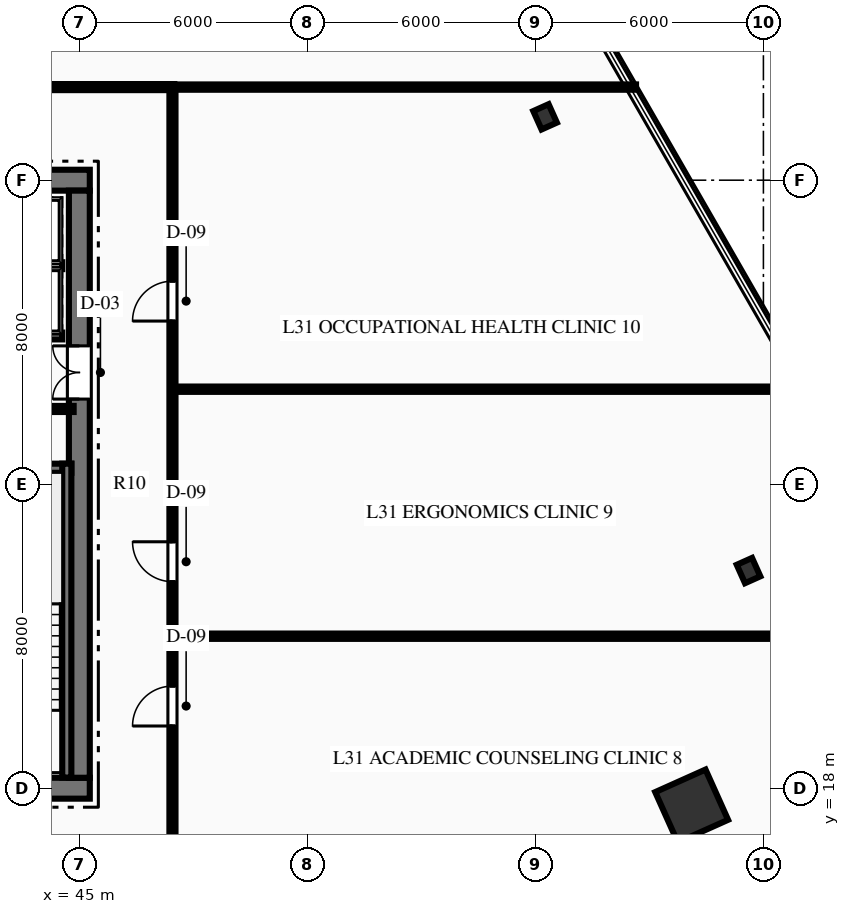
"""IFC4 building model, lengths in metres.
Left out: names, types, materials, properties, quantities, classifications, styles, units other than length and angle.
Written with IfcOpenShell. Run it as: python <this file> out.ifc"""

import sys

from ifc_helpers import new_model, si_unit, direction, frame, frame_2d, origin, origin_2d, place, context, subcontext, project, spatial, rectangle, hollow_rectangle, i_section, extrude, element, fill, save


model = new_model("IFC4")
c1 = context("Model", 3, precision=1e-05, world=origin(), true_north=direction((0.0, 1.0)))
c2 = subcontext(c1, "Body", "Model", "MODEL_VIEW")
j1 = project(units=[si_unit("LENGTHUNIT", "METRE"), si_unit("PLANEANGLEUNIT", "RADIAN")], contexts=[c1])
p1 = place(None, origin())
s1 = spatial("IfcSite", under=j1, at=p1, CompositionType="ELEMENT")
p2 = place(p1, origin())
s2 = spatial("IfcBuilding", under=s1, at=p2, CompositionType="ELEMENT")
p3 = place(p2, frame((0.0, 0.0, 127.95)))
s3 = spatial("IfcBuildingStorey", under=s2, at=p3, CompositionType="ELEMENT", Elevation=127.95)
p4 = place(p3, frame((26.725, 18.0, 0.0), z_axis=(0.0, 0.0, 1.0), x_axis=(1.0, 0.0, 0.0)))
e1 = element("IfcWall", 1, at=p4, inside=s3, PredefinedType="SHEAR", context=c2, shape_type="SweptSolid", body=[
    extrude(rectangle(XDim=18.55, YDim=0.55, at=frame_2d((9.275, 0.0))), origin(), (0.0, 0.0, 1.0), 3.75),
])
p5 = place(p4, frame((7.375, 0.0, 0.0)))
e2 = element("IfcOpeningElement", 2, at=p5, cuts=e1, PredefinedType="OPENING", context=c2, shape_type="SweptSolid", body=[
    extrude(rectangle(XDim=1.1, YDim=2.15, at=frame_2d((0.55, 1.075))), frame((0.0, 0.285, 0.0), z_axis=(0.0, -1.0, 0.0), x_axis=(1.0, 0.0, 0.0)), (0.0, 0.0, 1.0), 0.57),
])
p6 = place(p4, frame((10.075, 0.0, 0.0)))
e3 = element("IfcOpeningElement", 3, at=p6, cuts=e1, PredefinedType="OPENING", context=c2, shape_type="SweptSolid", body=[
    extrude(rectangle(XDim=1.1, YDim=2.15, at=frame_2d((0.55, 1.075))), frame((0.0, 0.285, 0.0), z_axis=(0.0, -1.0, 0.0), x_axis=(1.0, 0.0, 0.0)), (0.0, 0.0, 1.0), 0.57),
])
p7 = place(p3, frame((26.725, 34.0, 0.0), z_axis=(0.0, 0.0, 1.0), x_axis=(1.0, 0.0, 0.0)))
e4 = element("IfcWall", 4, at=p7, inside=s3, PredefinedType="SHEAR", context=c2, shape_type="SweptSolid", body=[
    extrude(rectangle(XDim=18.55, YDim=0.55, at=frame_2d((9.275, 0.0))), origin(), (0.0, 0.0, 1.0), 3.75),
])
p8 = place(p7, frame((1.24, 0.0, 0.0)))
e5 = element("IfcOpeningElement", 5, at=p8, cuts=e4, PredefinedType="OPENING", context=c2, shape_type="SweptSolid", body=[
    extrude(rectangle(XDim=1.1, YDim=2.15, at=frame_2d((0.55, 1.075))), frame((0.0, 0.285, 0.0), z_axis=(0.0, -1.0, 0.0), x_axis=(1.0, 0.0, 0.0)), (0.0, 0.0, 1.0), 0.57),
])
p9 = place(p7, frame((3.49, 0.0, 0.0)))
e6 = element("IfcOpeningElement", 6, at=p9, cuts=e4, PredefinedType="OPENING", context=c2, shape_type="SweptSolid", body=[
    extrude(rectangle(XDim=1.1, YDim=2.15, at=frame_2d((0.55, 1.075))), frame((0.0, 0.285, 0.0), z_axis=(0.0, -1.0, 0.0), x_axis=(1.0, 0.0, 0.0)), (0.0, 0.0, 1.0), 0.57),
])
p10 = place(p7, frame((13.96, 0.0, 0.0)))
e7 = element("IfcOpeningElement", 7, at=p10, cuts=e4, PredefinedType="OPENING", context=c2, shape_type="SweptSolid", body=[
    extrude(rectangle(XDim=1.1, YDim=2.15, at=frame_2d((0.55, 1.075))), frame((0.0, 0.285, 0.0), z_axis=(0.0, -1.0, 0.0), x_axis=(1.0, 0.0, 0.0)), (0.0, 0.0, 1.0), 0.57),
])
p11 = place(p7, frame((16.21, 0.0, 0.0)))
e8 = element("IfcOpeningElement", 8, at=p11, cuts=e4, PredefinedType="OPENING", context=c2, shape_type="SweptSolid", body=[
    extrude(rectangle(XDim=1.1, YDim=2.15, at=frame_2d((0.55, 1.075))), frame((0.0, 0.285, 0.0), z_axis=(0.0, -1.0, 0.0), x_axis=(1.0, 0.0, 0.0)), (0.0, 0.0, 1.0), 0.57),
])
p12 = place(p3, frame((45.0, 18.275, 0.0), z_axis=(0.0, 0.0, 1.0), x_axis=(0.0, 1.0, 0.0)))
e9 = element("IfcWall", 9, at=p12, inside=s3, PredefinedType="SHEAR", context=c2, shape_type="SweptSolid", body=[
    extrude(rectangle(XDim=15.45, YDim=0.55, at=frame_2d((7.725, 0.0))), origin(), (0.0, 0.0, 1.0), 3.75),
])
p13 = place(p12, frame((9.965, 0.0, 0.0)))
e10 = element("IfcOpeningElement", 10, at=p13, cuts=e9, PredefinedType="OPENING", context=c2, shape_type="SweptSolid", body=[
    extrude(rectangle(XDim=1.4, YDim=2.2, at=frame_2d((0.7, 1.1))), frame((0.0, 0.285, 0.0), z_axis=(0.0, -1.0, 0.0), x_axis=(1.0, 0.0, 0.0)), (0.0, 0.0, 1.0), 0.57),
])
p14 = place(p3, frame((40.81, 26.42, 0.0), z_axis=(0.0, 0.0, 1.0), x_axis=(1.0, 0.0, 0.0)))
e11 = element("IfcWall", 11, at=p14, inside=s3, PredefinedType="SHEAR", context=c2, shape_type="SweptSolid", body=[
    extrude(rectangle(XDim=3.98, YDim=0.24, at=frame_2d((1.99, 0.0))), origin(), (0.0, 0.0, 1.0), 3.75),
])
p15 = place(p3, frame((44.67, 18.28, 0.0), z_axis=(0.0, 0.0, 1.0), x_axis=(0.0, 1.0, 0.0)))
e12 = element("IfcWall", 12, at=p15, inside=s3, PredefinedType="SHEAR", context=c2, shape_type="SweptSolid", body=[
    extrude(rectangle(XDim=8.26, YDim=0.24, at=frame_2d((4.13, 0.0))), origin(), (0.0, 0.0, 1.0), 3.75),
])
p16 = place(p3, frame((61.112, 17.533, 0.0), z_axis=(0.0, 0.0, 1.0), x_axis=(0.912477494148, 0.409126902895, 0.0)))
e13 = element("IfcColumn", 13, at=p16, inside=s3, PredefinedType="COLUMN", context=c2, shape_type="SweptSolid", body=[
    extrude(hollow_rectangle(XDim=1.45, YDim=1.45, WallThickness=0.07, at=origin_2d()), origin(), (0.0, 0.0, 1.0), 3.75),
])
for number, where, z_axis, x_axis in (
    (14, (62.609, 23.727, 0.0), (0.0, 0.0, 1.0), (0.912, 0.409, 0.0)),
    (15, (57.255, 35.667, 0.0), (0.0, 0.0, 1.0), (0.912, 0.409, 0.0)),
):
    element("IfcColumn", number, at=place(p3, frame(where, z_axis=z_axis, x_axis=x_axis)), inside=s3, PredefinedType="COLUMN", context=c2, shape_type="SweptSolid", body=[
        extrude(i_section(OverallWidth=0.442, OverallDepth=0.531, WebThickness=0.066, FlangeThickness=0.106, at=origin_2d()), origin(), (0.0, 0.0, 1.0), 3.75),
    ])
p17 = place(p3, frame((40.8, 27.98, 0.0), z_axis=(0.0, 0.0, 1.0), x_axis=(1.0, 0.0, 0.0)))
e16 = element("IfcWall", 16, at=p17, inside=s3, PredefinedType="PARTITIONING", context=c2, shape_type="SweptSolid", body=[
    extrude(rectangle(XDim=4.05, YDim=0.16, at=frame_2d((2.025, 0.0))), origin(), (0.0, 0.0, 1.0), 3.4),
])
p18 = place(p17, frame((0.407, 0.0, 0.0)))
e17 = element("IfcOpeningElement", 17, at=p18, cuts=e16, PredefinedType="OPENING", context=c2, shape_type="SweptSolid", body=[
    extrude(rectangle(XDim=0.9, YDim=2.15, at=frame_2d((0.45, 1.075))), frame((0.0, 0.09, 0.0), z_axis=(0.0, -1.0, 0.0), x_axis=(1.0, 0.0, 0.0)), (0.0, 0.0, 1.0), 0.18),
])
p19 = place(p17, frame((2.2, 0.0, 0.0)))
e18 = element("IfcOpeningElement", 18, at=p19, cuts=e16, PredefinedType="OPENING", context=c2, shape_type="SweptSolid", body=[
    extrude(rectangle(XDim=0.9, YDim=2.15, at=frame_2d((0.45, 1.075))), frame((0.0, 0.09, 0.0), z_axis=(0.0, -1.0, 0.0), x_axis=(1.0, 0.0, 0.0)), (0.0, 0.0, 1.0), 0.18),
])
p20 = place(p3, frame((40.12, 29.9, 0.0), z_axis=(0.0, 0.0, 1.0), x_axis=(1.0, 0.0, 0.0)))
e19 = element("IfcWall", 19, at=p20, inside=s3, PredefinedType="PARTITIONING", context=c2, shape_type="SweptSolid", body=[
    extrude(rectangle(XDim=4.43, YDim=0.18, at=frame_2d((2.215, 0.0))), origin(), (0.0, 0.0, 1.0), 3.4),
])
p21 = place(p20, frame((0.565, 0.0, 0.0)))
e20 = element("IfcOpeningElement", 20, at=p21, cuts=e19, PredefinedType="OPENING", context=c2, shape_type="SweptSolid", body=[
    extrude(rectangle(XDim=1.1, YDim=2.15, at=frame_2d((0.55, 1.075))), frame((0.0, 0.1, 0.0), z_axis=(0.0, -1.0, 0.0), x_axis=(1.0, 0.0, 0.0)), (0.0, 0.0, 1.0), 0.2),
])
p22 = place(p20, frame((2.815, 0.0, 0.0)))
e21 = element("IfcOpeningElement", 21, at=p22, cuts=e19, PredefinedType="OPENING", context=c2, shape_type="SweptSolid", body=[
    extrude(rectangle(XDim=1.1, YDim=2.15, at=frame_2d((0.55, 1.075))), frame((0.0, 0.1, 0.0), z_axis=(0.0, -1.0, 0.0), x_axis=(1.0, 0.0, 0.0)), (0.0, 0.0, 1.0), 0.2),
])
p23 = place(p3, frame((40.12, 31.75, 0.0), z_axis=(0.0, 0.0, 1.0), x_axis=(1.0, 0.0, 0.0)))
e22 = element("IfcWall", 22, at=p23, inside=s3, PredefinedType="PARTITIONING", context=c2, shape_type="SweptSolid", body=[
    extrude(rectangle(XDim=4.43, YDim=0.18, at=frame_2d((2.215, 0.0))), origin(), (0.0, 0.0, 1.0), 3.4),
])
p24 = place(p3, frame((24.5, 36.45, 0.0), z_axis=(0.0, 0.0, 1.0), x_axis=(1.0, 0.0, 0.0)))
e23 = element("IfcWall", 23, at=p24, inside=s3, PredefinedType="PARTITIONING", context=c2, shape_type="SweptSolid", body=[
    extrude(rectangle(XDim=23.0, YDim=0.16, at=frame_2d((11.5, 0.0))), origin(), (0.0, 0.0, 1.0), 3.4),
])
p25 = place(p24, frame((0.53, 0.0, 0.0)))
e24 = element("IfcOpeningElement", 24, at=p25, cuts=e23, PredefinedType="OPENING", context=c2, shape_type="SweptSolid", body=[
    extrude(rectangle(XDim=1.05, YDim=2.15, at=frame_2d((0.525, 1.075))), frame((0.0, 0.09, 0.0), z_axis=(0.0, -1.0, 0.0), x_axis=(1.0, 0.0, 0.0)), (0.0, 0.0, 1.0), 0.18),
])
p26 = place(p24, frame((9.755, 0.0, 0.0)))
e25 = element("IfcOpeningElement", 25, at=p26, cuts=e23, PredefinedType="OPENING", context=c2, shape_type="SweptSolid", body=[
    extrude(rectangle(XDim=1.05, YDim=2.15, at=frame_2d((0.525, 1.075))), frame((0.0, 0.09, 0.0), z_axis=(0.0, -1.0, 0.0), x_axis=(1.0, 0.0, 0.0)), (0.0, 0.0, 1.0), 0.18),
])
p27 = place(p24, frame((16.129, 0.0, 0.0)))
e26 = element("IfcOpeningElement", 26, at=p27, cuts=e23, PredefinedType="OPENING", context=c2, shape_type="SweptSolid", body=[
    extrude(rectangle(XDim=1.05, YDim=2.15, at=frame_2d((0.525, 1.075))), frame((0.0, 0.09, 0.0), z_axis=(0.0, -1.0, 0.0), x_axis=(1.0, 0.0, 0.0)), (0.0, 0.0, 1.0), 0.18),
])
p28 = place(p3, frame((47.45, 15.55, 0.0), z_axis=(0.0, 0.0, 1.0), x_axis=(0.0, 1.0, 0.0)))
e27 = element("IfcWall", 27, at=p28, inside=s3, PredefinedType="PARTITIONING", context=c2, shape_type="SweptSolid", body=[
    extrude(rectangle(XDim=20.9, YDim=0.16, at=frame_2d((10.45, 0.0))), origin(), (0.0, 0.0, 1.0), 3.4),
])
p29 = place(p28, frame((4.087, 0.0, 0.0)))
e28 = element("IfcOpeningElement", 28, at=p29, cuts=e27, PredefinedType="OPENING", context=c2, shape_type="SweptSolid", body=[
    extrude(rectangle(XDim=1.05, YDim=2.15, at=frame_2d((0.525, 1.075))), frame((0.0, 0.09, 0.0), z_axis=(0.0, -1.0, 0.0), x_axis=(1.0, 0.0, 0.0)), (0.0, 0.0, 1.0), 0.18),
])
p30 = place(p28, frame((7.885, 0.0, 0.0)))
e29 = element("IfcOpeningElement", 29, at=p30, cuts=e27, PredefinedType="OPENING", context=c2, shape_type="SweptSolid", body=[
    extrude(rectangle(XDim=1.05, YDim=2.15, at=frame_2d((0.525, 1.075))), frame((0.0, 0.09, 0.0), z_axis=(0.0, -1.0, 0.0), x_axis=(1.0, 0.0, 0.0)), (0.0, 0.0, 1.0), 0.18),
])
p31 = place(p28, frame((14.743, 0.0, 0.0)))
e30 = element("IfcOpeningElement", 30, at=p31, cuts=e27, PredefinedType="OPENING", context=c2, shape_type="SweptSolid", body=[
    extrude(rectangle(XDim=1.05, YDim=2.15, at=frame_2d((0.525, 1.075))), frame((0.0, 0.09, 0.0), z_axis=(0.0, -1.0, 0.0), x_axis=(1.0, 0.0, 0.0)), (0.0, 0.0, 1.0), 0.18),
])
p32 = place(p3, frame((47.45, 36.45, 0.0), z_axis=(0.0, 0.0, 1.0), x_axis=(1.0, 0.0, 0.0)))
e31 = element("IfcWall", 31, at=p32, inside=s3, PredefinedType="PARTITIONING", context=c2, shape_type="SweptSolid", body=[
    extrude(rectangle(XDim=12.198, YDim=0.14, at=frame_2d((6.099, 0.0))), origin(), (0.0, 0.0, 1.0), 3.4),
])
p33 = place(p3, frame((47.45, 22.0, 0.0), z_axis=(0.0, 0.0, 1.0), x_axis=(1.0, 0.0, 0.0)))
e32 = element("IfcWall", 32, at=p33, inside=s3, PredefinedType="PARTITIONING", context=c2, shape_type="SweptSolid", body=[
    extrude(rectangle(XDim=20.508, YDim=0.14, at=frame_2d((10.254, 0.0))), origin(), (0.0, 0.0, 1.0), 3.4),
])
p34 = place(p3, frame((47.45, 28.5, 0.0), z_axis=(0.0, 0.0, 1.0), x_axis=(1.0, 0.0, 0.0)))
e33 = element("IfcWall", 33, at=p34, inside=s3, PredefinedType="PARTITIONING", context=c2, shape_type="SweptSolid", body=[
    extrude(rectangle(XDim=16.77, YDim=0.14, at=frame_2d((8.385, 0.0))), origin(), (0.0, 0.0, 1.0), 3.4),
])
p35 = place(p13, origin())
e34 = element("IfcDoor", 34, at=p35, inside=s3, OperationType="DOUBLE_DOOR_SINGLE_SWING", PredefinedType="DOOR", context=c2, shape_type="SweptSolid", body=[
    extrude(rectangle(XDim=1.4, YDim=2.2, at=frame_2d((0.7, 1.1))), frame((0.0, 0.025, 0.0), z_axis=(0.0, -1.0, 0.0), x_axis=(1.0, 0.0, 0.0)), (0.0, 0.0, 1.0), 0.05),
])
fill(e10, e34)
p36 = place(p29, origin())
e35 = element("IfcDoor", 35, at=p36, inside=s3, OperationType="SINGLE_SWING_LEFT", PredefinedType="DOOR", context=c2, shape_type="SweptSolid", body=[
    extrude(rectangle(XDim=1.05, YDim=2.15, at=frame_2d((0.525, 1.075))), frame((0.0, 0.025, 0.0), z_axis=(0.0, -1.0, 0.0), x_axis=(1.0, 0.0, 0.0)), (0.0, 0.0, 1.0), 0.05),
])
fill(e28, e35)
p37 = place(p30, origin())
e36 = element("IfcDoor", 36, at=p37, inside=s3, OperationType="SINGLE_SWING_RIGHT", PredefinedType="DOOR", context=c2, shape_type="SweptSolid", body=[
    extrude(rectangle(XDim=1.05, YDim=2.15, at=frame_2d((0.525, 1.075))), frame((0.0, 0.025, 0.0), z_axis=(0.0, -1.0, 0.0), x_axis=(1.0, 0.0, 0.0)), (0.0, 0.0, 1.0), 0.05),
])
fill(e29, e36)
p38 = place(p31, origin())
e37 = element("IfcDoor", 37, at=p38, inside=s3, OperationType="SINGLE_SWING_LEFT", PredefinedType="DOOR", context=c2, shape_type="SweptSolid", body=[
    extrude(rectangle(XDim=1.05, YDim=2.15, at=frame_2d((0.525, 1.075))), frame((0.0, 0.025, 0.0), z_axis=(0.0, -1.0, 0.0), x_axis=(1.0, 0.0, 0.0)), (0.0, 0.0, 1.0), 0.05),
])
fill(e30, e37)
save(model, sys.argv[1])
